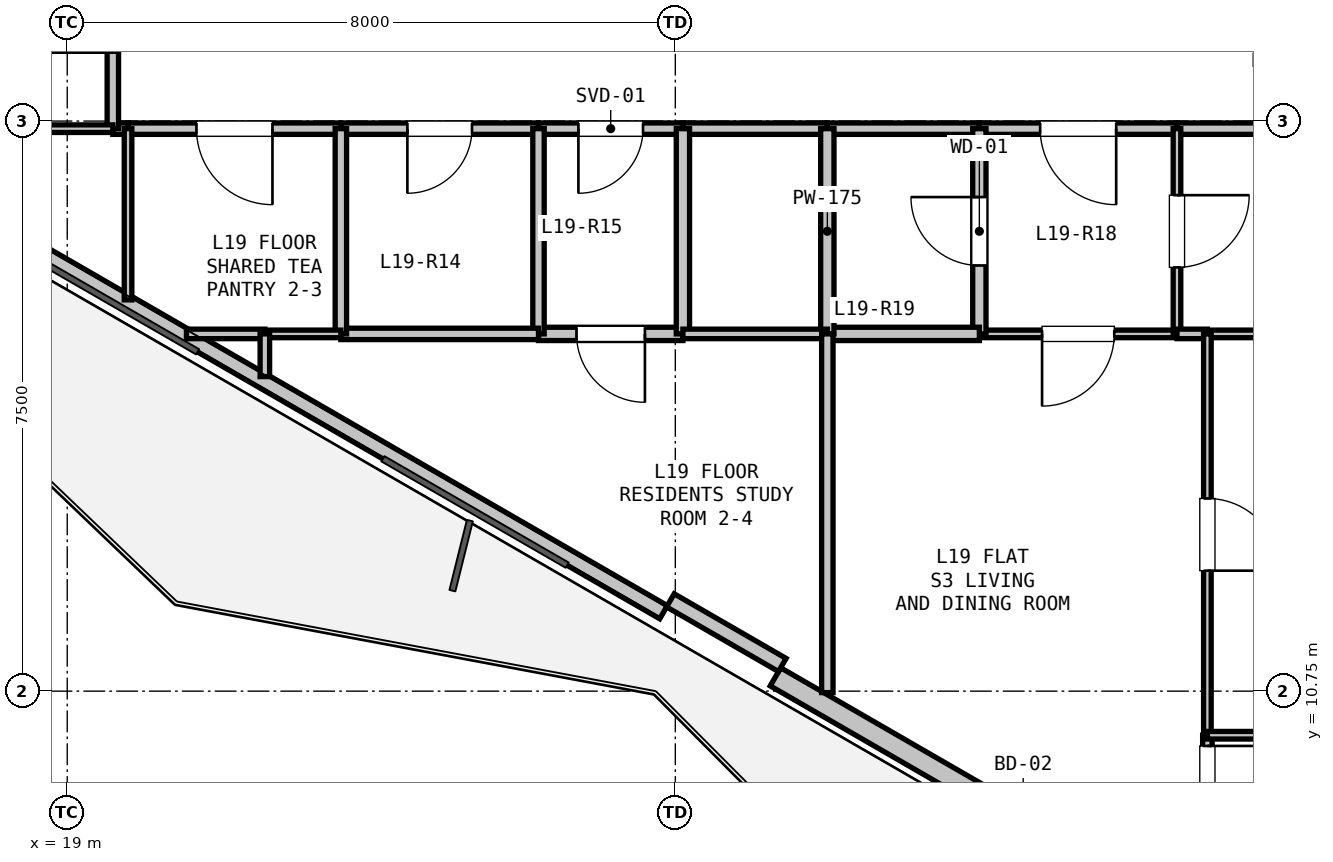
"""IFC4 building model, lengths in metres.
Left out: names, types, materials, properties, quantities, classifications, styles, units other than length and angle.
Written with IfcOpenShell. Run it as: python <this file> out.ifc"""

import sys

from ifc_helpers import new_model, si_unit, direction, frame, frame_2d, origin, place, context, subcontext, project, spatial, rectangle, extrude, element, fill, save


model = new_model("IFC4")
c1 = context("Model", 3, precision=1e-05, world=origin(), true_north=direction((0.0, 1.0)))
c2 = subcontext(c1, "Body", "Model", "MODEL_VIEW")
j1 = project(units=[si_unit("LENGTHUNIT", "METRE"), si_unit("PLANEANGLEUNIT", "RADIAN")], contexts=[c1])
p1 = place(None, origin())
s1 = spatial("IfcSite", under=j1, at=p1, CompositionType="ELEMENT")
p2 = place(p1, origin())
s2 = spatial("IfcBuilding", under=s1, at=p2, CompositionType="ELEMENT")
p3 = place(p2, frame((0.0, 0.0, 73.5)))
s3 = spatial("IfcBuildingStorey", under=s2, at=p3, CompositionType="ELEMENT", Elevation=73.5)
p4 = place(p3, frame((38.649, 4.973, 0.0), z_axis=(0.0, 0.0, 1.0), x_axis=(-0.866023023012, 0.500004123596, 0.0)))
e1 = element("IfcWall", 1, at=p4, inside=s3, PredefinedType="SOLIDWALL", context=c2, shape_type="SweptSolid", body=[
    extrude(rectangle(XDim=11.93, YDim=0.275, at=frame_2d((5.965, 0.0))), origin(), (0.0, 0.0, 1.0), 2.67),
])
p5 = place(p4, frame((7.616, 0.0, 0.0)))
e2 = element("IfcOpeningElement", 2, at=p5, cuts=e1, PredefinedType="OPENING", context=c2, shape_type="SweptSolid", body=[
    extrude(rectangle(XDim=1.1, YDim=2.1, at=frame_2d((0.55, 1.05))), frame((0.0, 0.147, 0.0), z_axis=(0.0, -1.0, 0.0), x_axis=(1.0, 0.0, 0.0)), (0.0, 0.0, 1.0), 0.295),
])
p6 = place(p4, frame((2.207, 0.0, 0.9)))
e3 = element("IfcOpeningElement", 3, at=p6, cuts=e1, PredefinedType="OPENING", context=c2, shape_type="SweptSolid", body=[
    extrude(rectangle(XDim=1.2, YDim=1.4, at=frame_2d((0.6, 0.7))), frame((0.0, 0.147, 0.0), z_axis=(0.0, -1.0, 0.0), x_axis=(1.0, 0.0, 0.0)), (0.0, 0.0, 1.0), 0.295),
])
p7 = place(p3, frame((26.845, 11.788, 0.0), z_axis=(0.0, 0.0, 1.0), x_axis=(-0.866027010039, 0.499997217876, 0.0)))
e4 = element("IfcWall", 4, at=p7, inside=s3, PredefinedType="PARAPET", context=c2, shape_type="SweptSolid", body=[
    extrude(rectangle(XDim=11.229, YDim=0.2, at=frame_2d((5.615, 0.0))), origin(), (0.0, 0.0, 1.0), 0.2),
])
p8 = place(p3, frame((28.407, 11.094, 0.0), z_axis=(0.0, 0.0, 1.0), x_axis=(-0.86605165483, 0.499954529098, 0.0)))
e5 = element("IfcWall", 5, at=p8, inside=s3, PredefinedType="PARAPET", context=c2, shape_type="SweptSolid", body=[
    extrude(rectangle(XDim=1.7, YDim=0.2, at=frame_2d((0.85, 0.0))), origin(), (0.0, 0.0, 1.0), 2.67),
])
p9 = place(p3, frame((35.8, 18.15, 0.0), z_axis=(0.0, 0.0, 1.0), x_axis=(-1.0, 0.0, 0.0)))
e6 = element("IfcWall", 6, at=p9, inside=s3, PredefinedType="PARTITIONING", context=c2, shape_type="SweptSolid", body=[
    extrude(rectangle(XDim=2.2, YDim=0.15, at=frame_2d((1.1, 0.0))), origin(), (0.0, 0.0, 1.0), 3.05),
])
p10 = place(p3, frame((33.6, 18.15, 0.0), z_axis=(0.0, 0.0, 1.0), x_axis=(-1.0, 0.0, 0.0)))
e7 = element("IfcWall", 7, at=p10, inside=s3, PredefinedType="PARTITIONING", context=c2, shape_type="SweptSolid", body=[
    extrude(rectangle(XDim=2.6, YDim=0.15, at=frame_2d((1.3, 0.0))), origin(), (0.0, 0.0, 1.0), 3.05),
])
p11 = place(p10, frame((0.8, 0.0, 0.0)))
e8 = element("IfcOpeningElement", 8, at=p11, cuts=e7, PredefinedType="OPENING", context=c2, shape_type="SweptSolid", body=[
    extrude(rectangle(XDim=1.0, YDim=2.15, at=frame_2d((0.5, 1.075))), frame((0.0, 0.085, 0.0), z_axis=(0.0, -1.0, 0.0), x_axis=(1.0, 0.0, 0.0)), (0.0, 0.0, 1.0), 0.17),
])
p12 = place(p3, frame((31.0, 18.15, 0.0), z_axis=(0.0, 0.0, 1.0), x_axis=(-1.0, 0.0, 0.0)))
e9 = element("IfcWall", 9, at=p12, inside=s3, PredefinedType="PARTITIONING", context=c2, shape_type="SweptSolid", body=[
    extrude(rectangle(XDim=2.0, YDim=0.15, at=frame_2d((1.0, 0.0))), origin(), (0.0, 0.0, 1.0), 3.05),
])
p13 = place(p3, frame((29.0, 18.15, 0.0), z_axis=(0.0, 0.0, 1.0), x_axis=(-1.0, 0.0, 0.0)))
e10 = element("IfcWall", 10, at=p13, inside=s3, PredefinedType="PARTITIONING", context=c2, shape_type="SweptSolid", body=[
    extrude(rectangle(XDim=1.9, YDim=0.15, at=frame_2d((0.95, 0.0))), origin(), (0.0, 0.0, 1.0), 3.05),
])
p14 = place(p3, frame((27.1, 18.15, 0.0), z_axis=(0.0, 0.0, 1.0), x_axis=(-1.0, 0.0, 0.0)))
e11 = element("IfcWall", 11, at=p14, inside=s3, PredefinedType="PARTITIONING", context=c2, shape_type="SweptSolid", body=[
    extrude(rectangle(XDim=1.9, YDim=0.15, at=frame_2d((0.95, 0.0))), origin(), (0.0, 0.0, 1.0), 3.05),
])
p15 = place(p14, frame((0.525, 0.0, 0.0)))
e12 = element("IfcOpeningElement", 12, at=p15, cuts=e11, PredefinedType="OPENING", context=c2, shape_type="SweptSolid", body=[
    extrude(rectangle(XDim=0.85, YDim=2.1, at=frame_2d((0.425, 1.05))), frame((0.0, 0.085, 0.0), z_axis=(0.0, -1.0, 0.0), x_axis=(1.0, 0.0, 0.0)), (0.0, 0.0, 1.0), 0.17),
])
p16 = place(p3, frame((25.2, 18.15, 0.0), z_axis=(0.0, 0.0, 1.0), x_axis=(-1.0, 0.0, 0.0)))
e13 = element("IfcWall", 13, at=p16, inside=s3, PredefinedType="PARTITIONING", context=c2, shape_type="SweptSolid", body=[
    extrude(rectangle(XDim=2.6, YDim=0.15, at=frame_2d((1.3, 0.0))), origin(), (0.0, 0.0, 1.0), 2.423),
])
p17 = place(p16, frame((0.875, 0.0, 0.0)))
e14 = element("IfcOpeningElement", 14, at=p17, cuts=e13, PredefinedType="OPENING", context=c2, shape_type="SweptSolid", body=[
    extrude(rectangle(XDim=0.85, YDim=2.1, at=frame_2d((0.425, 1.05))), frame((0.0, 0.085, 0.0), z_axis=(0.0, -1.0, 0.0), x_axis=(1.0, 0.0, 0.0)), (0.0, 0.0, 1.0), 0.17),
])
p18 = place(p3, frame((22.6, 18.15, 0.0), z_axis=(0.0, 0.0, 1.0), x_axis=(-1.0, 0.0, 0.0)))
e15 = element("IfcWall", 15, at=p18, inside=s3, PredefinedType="PARTITIONING", context=c2, shape_type="SweptSolid", body=[
    extrude(rectangle(XDim=2.8, YDim=0.15, at=frame_2d((1.4, 0.0))), origin(), (0.0, 0.0, 1.0), 3.05),
])
p19 = place(p18, frame((0.9, 0.0, 0.0)))
e16 = element("IfcOpeningElement", 16, at=p19, cuts=e15, PredefinedType="OPENING", context=c2, shape_type="SweptSolid", body=[
    extrude(rectangle(XDim=1.0, YDim=2.15, at=frame_2d((0.5, 1.075))), frame((0.0, 0.085, 0.0), z_axis=(0.0, -1.0, 0.0), x_axis=(1.0, 0.0, 0.0)), (0.0, 0.0, 1.0), 0.17),
])
p20 = place(p3, frame((19.8, 18.15, 0.0), z_axis=(0.0, 0.0, 1.0), x_axis=(-1.0, 0.0, 0.0)))
e17 = element("IfcWall", 17, at=p20, inside=s3, PredefinedType="PARTITIONING", context=c2, shape_type="SweptSolid", body=[
    extrude(rectangle(XDim=0.2, YDim=0.15, at=frame_2d((0.1, 0.0))), origin(), (0.0, 0.0, 1.0), 3.05),
])
p21 = place(p3, frame((19.6, 18.15, 0.0), z_axis=(0.0, 0.0, 1.0), x_axis=(0.0, 1.0, 0.0)))
e18 = element("IfcWall", 18, at=p21, inside=s3, PredefinedType="PARTITIONING", context=c2, shape_type="SweptSolid", body=[
    extrude(rectangle(XDim=3.0, YDim=0.15, at=frame_2d((1.5, 0.0))), origin(), (0.0, 0.0, 1.0), 2.423),
])
p22 = place(p21, frame((1.0, 0.0, 0.0)))
e19 = element("IfcOpeningElement", 19, at=p22, cuts=e18, PredefinedType="OPENING", context=c2, shape_type="SweptSolid", body=[
    extrude(rectangle(XDim=1.0, YDim=2.15, at=frame_2d((0.5, 1.075))), frame((0.0, 0.085, 0.0), z_axis=(0.0, -1.0, 0.0), x_axis=(1.0, 0.0, 0.0)), (0.0, 0.0, 1.0), 0.17),
])
p23 = place(p3, frame((33.6, 15.45, 0.0), z_axis=(0.0, 0.0, 1.0), x_axis=(-1.0, 0.0, 0.0)))
e20 = element("IfcWall", 20, at=p23, inside=s3, PredefinedType="PARTITIONING", context=c2, shape_type="SweptSolid", body=[
    extrude(rectangle(XDim=2.6, YDim=0.1, at=frame_2d((1.3, 0.0))), origin(), (0.0, 0.0, 1.0), 3.05),
])
p24 = place(p23, frame((0.825, 0.0, 0.0)))
e21 = element("IfcOpeningElement", 21, at=p24, cuts=e20, PredefinedType="OPENING", context=c2, shape_type="SweptSolid", body=[
    extrude(rectangle(XDim=0.95, YDim=2.1, at=frame_2d((0.475, 1.05))), frame((0.0, 0.06, 0.0), z_axis=(0.0, -1.0, 0.0), x_axis=(1.0, 0.0, 0.0)), (0.0, 0.0, 1.0), 0.12),
])
p25 = place(p3, frame((31.0, 15.45, 0.0), z_axis=(0.0, 0.0, 1.0), x_axis=(0.0, 1.0, 0.0)))
e22 = element("IfcWall", 22, at=p25, inside=s3, PredefinedType="PLUMBINGWALL", context=c2, shape_type="SweptSolid", body=[
    extrude(rectangle(XDim=2.7, YDim=0.175, at=frame_2d((1.35, 0.0))), origin(), (0.0, 0.0, 1.0), 3.05),
])
p26 = place(p25, frame((0.9, 0.0, 0.0)))
e23 = element("IfcOpeningElement", 23, at=p26, cuts=e22, PredefinedType="OPENING", context=c2, shape_type="SweptSolid", body=[
    extrude(rectangle(XDim=0.9, YDim=2.1, at=frame_2d((0.45, 1.05))), frame((0.0, 0.097, 0.0), z_axis=(0.0, -1.0, 0.0), x_axis=(1.0, 0.0, 0.0)), (0.0, 0.0, 1.0), 0.195),
])
p27 = place(p3, frame((33.6, 18.15, 0.0), z_axis=(0.0, 0.0, 1.0), x_axis=(0.0, -1.0, 0.0)))
e24 = element("IfcWall", 24, at=p27, inside=s3, PredefinedType="PARTITIONING", context=c2, shape_type="SweptSolid", body=[
    extrude(rectangle(XDim=2.7, YDim=0.1, at=frame_2d((1.35, 0.0))), origin(), (0.0, 0.0, 1.0), 3.05),
])
p28 = place(p27, frame((0.875, 0.0, 0.0)))
e25 = element("IfcOpeningElement", 25, at=p28, cuts=e24, PredefinedType="OPENING", context=c2, shape_type="SweptSolid", body=[
    extrude(rectangle(XDim=0.95, YDim=2.1, at=frame_2d((0.475, 1.05))), frame((0.0, 0.06, 0.0), z_axis=(0.0, -1.0, 0.0), x_axis=(1.0, 0.0, 0.0)), (0.0, 0.0, 1.0), 0.12),
])
p29 = place(p3, frame((27.1, 15.45, 0.0), z_axis=(0.0, 0.0, 1.0), x_axis=(-1.0, 0.0, 0.0)))
e26 = element("IfcWall", 26, at=p29, inside=s3, PredefinedType="PLUMBINGWALL", context=c2, shape_type="SweptSolid", body=[
    extrude(rectangle(XDim=1.9, YDim=0.175, at=frame_2d((0.95, 0.0))), origin(), (0.0, 0.0, 1.0), 2.423),
])
p30 = place(p29, frame((0.5, 0.0, 0.0)))
e27 = element("IfcOpeningElement", 27, at=p30, cuts=e26, PredefinedType="OPENING", context=c2, shape_type="SweptSolid", body=[
    extrude(rectangle(XDim=0.9, YDim=2.1, at=frame_2d((0.45, 1.05))), frame((0.0, 0.097, 0.0), z_axis=(0.0, -1.0, 0.0), x_axis=(1.0, 0.0, 0.0)), (0.0, 0.0, 1.0), 0.195),
])
p31 = place(p3, frame((25.2, 15.45, 0.0), z_axis=(0.0, 0.0, 1.0), x_axis=(0.0, 1.0, 0.0)))
e28 = element("IfcWall", 28, at=p31, inside=s3, PredefinedType="PARTITIONING", context=c2, shape_type="SweptSolid", body=[
    extrude(rectangle(XDim=2.7, YDim=0.15, at=frame_2d((1.35, 0.0))), origin(), (0.0, 0.0, 1.0), 2.423),
])
p32 = place(p3, frame((27.1, 18.15, 0.0), z_axis=(0.0, 0.0, 1.0), x_axis=(0.0, -1.0, 0.0)))
e29 = element("IfcWall", 29, at=p32, inside=s3, PredefinedType="PLUMBINGWALL", context=c2, shape_type="SweptSolid", body=[
    extrude(rectangle(XDim=2.7, YDim=0.175, at=frame_2d((1.35, 0.0))), origin(), (0.0, 0.0, 1.0), 3.05),
])
p33 = place(p3, frame((31.0, 15.45, 0.0), z_axis=(0.0, 0.0, 1.0), x_axis=(-1.0, 0.0, 0.0)))
e30 = element("IfcWall", 30, at=p33, inside=s3, PredefinedType="PLUMBINGWALL", context=c2, shape_type="SweptSolid", body=[
    extrude(rectangle(XDim=2.0, YDim=0.175, at=frame_2d((1.0, 0.0))), origin(), (0.0, 0.0, 1.0), 3.05),
])
p34 = place(p3, frame((29.0, 15.45, 0.0), z_axis=(0.0, 0.0, 1.0), x_axis=(0.0, 1.0, 0.0)))
e31 = element("IfcWall", 31, at=p34, inside=s3, PredefinedType="PLUMBINGWALL", context=c2, shape_type="SweptSolid", body=[
    extrude(rectangle(XDim=2.7, YDim=0.175, at=frame_2d((1.35, 0.0))), origin(), (0.0, 0.0, 1.0), 3.05),
])
p35 = place(p3, frame((42.873, 15.45, 0.0), z_axis=(0.0, 0.0, 1.0), x_axis=(-1.0, 0.0, 0.0)))
e32 = element("IfcWall", 32, at=p35, inside=s3, PredefinedType="PARTITIONING", context=c2, shape_type="SweptSolid", body=[
    extrude(rectangle(XDim=8.873, YDim=0.1, at=frame_2d((4.437, 0.0))), origin(), (0.0, 0.0, 1.0), 2.365),
])
p36 = place(p35, frame((3.962, 0.0, 0.0)))
e33 = element("IfcOpeningElement", 33, at=p36, cuts=e32, PredefinedType="OPENING", context=c2, shape_type="SweptSolid", body=[
    extrude(rectangle(XDim=0.95, YDim=2.1, at=frame_2d((0.475, 1.05))), frame((0.0, 0.06, 0.0), z_axis=(0.0, -1.0, 0.0), x_axis=(1.0, 0.0, 0.0)), (0.0, 0.0, 1.0), 0.12),
])
p37 = place(p3, frame((34.0, 15.45, 0.0), z_axis=(0.0, 0.0, 1.0), x_axis=(-1.0, 0.0, 0.0)))
e34 = element("IfcWall", 34, at=p37, inside=s3, PredefinedType="PARTITIONING", context=c2, shape_type="SweptSolid", body=[
    extrude(rectangle(XDim=0.4, YDim=0.125, at=frame_2d((0.2, 0.0))), origin(), (0.0, 0.0, 1.0), 3.05),
])
p38 = place(p3, frame((19.6, 18.15, 0.0), z_axis=(0.0, 0.0, 1.0), x_axis=(-1.0, 0.0, 0.0)))
e35 = element("IfcWall", 35, at=p38, inside=s3, PredefinedType="PARTITIONING", context=c2, shape_type="SweptSolid", body=[
    extrude(rectangle(XDim=2.45, YDim=0.1, at=frame_2d((1.225, 0.0))), origin(), (0.0, 0.0, 1.0), 2.365),
])
p39 = place(p3, frame((25.2, 15.45, 0.0), z_axis=(0.0, 0.0, 1.0), x_axis=(-1.0, 0.0, 0.0)))
e36 = element("IfcWall", 36, at=p39, inside=s3, PredefinedType="PARTITIONING", context=c2, shape_type="SweptSolid", body=[
    extrude(rectangle(XDim=2.6, YDim=0.15, at=frame_2d((1.3, 0.0))), origin(), (0.0, 0.0, 1.0), 3.05),
])
p40 = place(p3, frame((22.6, 15.45, 0.0), z_axis=(0.0, 0.0, 1.0), x_axis=(0.0, 1.0, 0.0)))
e37 = element("IfcWall", 37, at=p40, inside=s3, PredefinedType="PARTITIONING", context=c2, shape_type="SweptSolid", body=[
    extrude(rectangle(XDim=2.7, YDim=0.15, at=frame_2d((1.35, 0.0))), origin(), (0.0, 0.0, 1.0), 3.05),
])
p41 = place(p3, frame((22.6, 15.45, 0.0), z_axis=(0.0, 0.0, 1.0), x_axis=(-1.0, 0.0, 0.0)))
e38 = element("IfcWall", 38, at=p41, inside=s3, PredefinedType="PARTITIONING", context=c2, shape_type="SweptSolid", body=[
    extrude(rectangle(XDim=1.0, YDim=0.1, at=frame_2d((0.5, 0.0))), origin(), (0.0, 0.0, 1.0), 2.365),
])
p42 = place(p3, frame((21.6, 15.45, 0.0), z_axis=(0.0, 0.0, 1.0), x_axis=(-1.0, 0.0, 0.0)))
e39 = element("IfcWall", 39, at=p42, inside=s3, PredefinedType="PARTITIONING", context=c2, shape_type="SweptSolid", body=[
    extrude(rectangle(XDim=1.032, YDim=0.125, at=frame_2d((0.516, 0.0))), origin(), (0.0, 0.0, 1.0), 2.365),
])
p43 = place(p3, frame((19.8, 15.897, 0.0), z_axis=(0.0, 0.0, 1.0), x_axis=(0.0, 1.0, 0.0)))
e40 = element("IfcWall", 40, at=p43, inside=s3, PredefinedType="PARTITIONING", context=c2, shape_type="SweptSolid", body=[
    extrude(rectangle(XDim=2.252, YDim=0.1, at=frame_2d((1.126, 0.0))), origin(), (0.0, 0.0, 1.0), 2.365),
])
p44 = place(p3, frame((27.1, 15.45, 0.0), z_axis=(0.0, 0.0, 1.0), x_axis=(1.0, 0.0, 0.0)))
e41 = element("IfcWall", 41, at=p44, inside=s3, PredefinedType="PARTITIONING", context=c2, shape_type="SweptSolid", body=[
    extrude(rectangle(XDim=1.9, YDim=0.125, at=frame_2d((0.95, 0.0))), origin(), (0.0, 0.0, 1.0), 3.05),
])
p45 = place(p3, frame((29.0, 15.45, 0.0), z_axis=(0.0, 0.0, 1.0), x_axis=(0.0, -1.0, 0.0)))
e42 = element("IfcWall", 42, at=p45, inside=s3, PredefinedType="PARTITIONING", context=c2, shape_type="SweptSolid", body=[
    extrude(rectangle(XDim=4.719, YDim=0.15, at=frame_2d((2.36, 0.0))), origin(), (0.0, 0.0, 1.0), 2.365),
])
p46 = place(p3, frame((21.6, 14.888, 0.0), z_axis=(0.0, 0.0, 1.0), x_axis=(0.0, 1.0, 0.0)))
e43 = element("IfcWall", 43, at=p46, inside=s3, PredefinedType="PARTITIONING", context=c2, shape_type="SweptSolid", body=[
    extrude(rectangle(XDim=0.562, YDim=0.125, at=frame_2d((0.281, 0.0))), origin(), (0.0, 0.0, 1.0), 2.365),
])
p47 = place(p3, frame((34.0, 15.45, 0.0), z_axis=(0.0, 0.0, 1.0), x_axis=(0.0, -1.0, 0.0)))
e44 = element("IfcWall", 44, at=p47, inside=s3, PredefinedType="PARTITIONING", context=c2, shape_type="SweptSolid", body=[
    extrude(rectangle(XDim=5.28, YDim=0.1, at=frame_2d((2.64, 0.0))), origin(), (0.0, 0.0, 1.0), 3.05),
])
p48 = place(p47, frame((2.165, 0.0, 0.0)))
e45 = element("IfcOpeningElement", 45, at=p48, cuts=e44, PredefinedType="OPENING", context=c2, shape_type="SweptSolid", body=[
    extrude(rectangle(XDim=0.95, YDim=2.1, at=frame_2d((0.475, 1.05))), frame((0.0, 0.06, 0.0), z_axis=(0.0, -1.0, 0.0), x_axis=(1.0, 0.0, 0.0)), (0.0, 0.0, 1.0), 0.12),
])
p49 = place(p3, frame((34.0, 10.17, 0.0), z_axis=(0.0, 0.0, 1.0), x_axis=(0.0, -1.0, 0.0)))
e46 = element("IfcWall", 46, at=p49, inside=s3, PredefinedType="PARTITIONING", context=c2, shape_type="SweptSolid", body=[
    extrude(rectangle(XDim=2.326, YDim=0.125, at=frame_2d((1.163, 0.0))), origin(), (0.0, 0.0, 1.0), 3.05),
])
p50 = place(p49, frame((0.141, 0.0, 0.0)))
e47 = element("IfcOpeningElement", 47, at=p50, cuts=e46, PredefinedType="OPENING", context=c2, shape_type="SweptSolid", body=[
    extrude(rectangle(XDim=0.95, YDim=2.1, at=frame_2d((0.475, 1.05))), frame((0.0, 0.073, 0.0), z_axis=(0.0, -1.0, 0.0), x_axis=(1.0, 0.0, 0.0)), (0.0, 0.0, 1.0), 0.145),
])
p51 = place(p3, frame((34.0, 10.17, 0.0), z_axis=(0.0, 0.0, 1.0), x_axis=(1.0, 0.0, 0.0)))
e48 = element("IfcWall", 48, at=p51, inside=s3, PredefinedType="PARTITIONING", context=c2, shape_type="SweptSolid", body=[
    extrude(rectangle(XDim=8.873, YDim=0.1, at=frame_2d((4.437, 0.0))), origin(), (0.0, 0.0, 1.0), 2.423),
])
p52 = place(p51, frame((3.962, 0.0, 0.0)))
e49 = element("IfcOpeningElement", 49, at=p52, cuts=e48, PredefinedType="OPENING", context=c2, shape_type="SweptSolid", body=[
    extrude(rectangle(XDim=0.95, YDim=2.1, at=frame_2d((0.475, 1.05))), frame((0.0, 0.06, 0.0), z_axis=(0.0, -1.0, 0.0), x_axis=(1.0, 0.0, 0.0)), (0.0, 0.0, 1.0), 0.12),
])
p53 = place(p11, origin())
e50 = element("IfcDoor", 50, at=p53, inside=s3, OperationType="SINGLE_SWING_LEFT", PredefinedType="DOOR", context=c2, shape_type="SweptSolid", body=[
    extrude(rectangle(XDim=1.0, YDim=2.15, at=frame_2d((0.5, 1.075))), frame((0.0, 0.025, 0.0), z_axis=(0.0, -1.0, 0.0), x_axis=(1.0, 0.0, 0.0)), (0.0, 0.0, 1.0), 0.05),
])
fill(e8, e50)
p54 = place(p15, origin())
e51 = element("IfcDoor", 51, at=p54, inside=s3, OperationType="SINGLE_SWING_RIGHT", PredefinedType="DOOR", context=c2, shape_type="SweptSolid", body=[
    extrude(rectangle(XDim=0.85, YDim=2.1, at=frame_2d((0.425, 1.05))), frame((0.0, 0.025, 0.0), z_axis=(0.0, -1.0, 0.0), x_axis=(1.0, 0.0, 0.0)), (0.0, 0.0, 1.0), 0.05),
])
fill(e12, e51)
p55 = place(p17, origin())
e52 = element("IfcDoor", 52, at=p55, inside=s3, OperationType="SINGLE_SWING_RIGHT", PredefinedType="DOOR", context=c2, shape_type="SweptSolid", body=[
    extrude(rectangle(XDim=0.85, YDim=2.1, at=frame_2d((0.425, 1.05))), frame((0.0, 0.025, 0.0), z_axis=(0.0, -1.0, 0.0), x_axis=(1.0, 0.0, 0.0)), (0.0, 0.0, 1.0), 0.05),
])
fill(e14, e52)
p56 = place(p19, origin())
e53 = element("IfcDoor", 53, at=p56, inside=s3, OperationType="SINGLE_SWING_LEFT", PredefinedType="DOOR", context=c2, shape_type="SweptSolid", body=[
    extrude(rectangle(XDim=1.0, YDim=2.15, at=frame_2d((0.5, 1.075))), frame((0.0, 0.025, 0.0), z_axis=(0.0, -1.0, 0.0), x_axis=(1.0, 0.0, 0.0)), (0.0, 0.0, 1.0), 0.05),
])
fill(e16, e53)
p57 = place(p26, origin())
e54 = element("IfcDoor", 54, at=p57, inside=s3, OperationType="SINGLE_SWING_RIGHT", PredefinedType="DOOR", context=c2, shape_type="SweptSolid", body=[
    extrude(rectangle(XDim=0.9, YDim=2.1, at=frame_2d((0.45, 1.05))), frame((0.0, 0.025, 0.0), z_axis=(0.0, -1.0, 0.0), x_axis=(1.0, 0.0, 0.0)), (0.0, 0.0, 1.0), 0.05),
])
fill(e23, e54)
p58 = place(p28, origin())
e55 = element("IfcDoor", 55, at=p58, inside=s3, OperationType="SINGLE_SWING_LEFT", PredefinedType="DOOR", context=c2, shape_type="SweptSolid", body=[
    extrude(rectangle(XDim=0.95, YDim=2.1, at=frame_2d((0.475, 1.05))), frame((0.0, 0.025, 0.0), z_axis=(0.0, -1.0, 0.0), x_axis=(1.0, 0.0, 0.0)), (0.0, 0.0, 1.0), 0.05),
])
fill(e25, e55)
p59 = place(p24, origin())
e56 = element("IfcDoor", 56, at=p59, inside=s3, OperationType="SINGLE_SWING_RIGHT", PredefinedType="DOOR", context=c2, shape_type="SweptSolid", body=[
    extrude(rectangle(XDim=0.95, YDim=2.1, at=frame_2d((0.475, 1.05))), frame((0.0, 0.025, 0.0), z_axis=(0.0, -1.0, 0.0), x_axis=(1.0, 0.0, 0.0)), (0.0, 0.0, 1.0), 0.05),
])
fill(e21, e56)
p60 = place(p50, origin())
e57 = element("IfcDoor", 57, at=p60, inside=s3, OperationType="SINGLE_SWING_LEFT", PredefinedType="DOOR", context=c2, shape_type="SweptSolid", body=[
    extrude(rectangle(XDim=0.95, YDim=2.1, at=frame_2d((0.475, 1.05))), frame((0.0, 0.025, 0.0), z_axis=(0.0, -1.0, 0.0), x_axis=(1.0, 0.0, 0.0)), (0.0, 0.0, 1.0), 0.05),
])
fill(e47, e57)
p61 = place(p48, origin())
e58 = element("IfcDoor", 58, at=p61, inside=s3, OperationType="SINGLE_SWING_RIGHT", PredefinedType="DOOR", context=c2, shape_type="SweptSolid", body=[
    extrude(rectangle(XDim=0.95, YDim=2.1, at=frame_2d((0.475, 1.05))), frame((0.0, 0.025, 0.0), z_axis=(0.0, -1.0, 0.0), x_axis=(1.0, 0.0, 0.0)), (0.0, 0.0, 1.0), 0.05),
])
fill(e45, e58)
p62 = place(p30, origin())
e59 = element("IfcDoor", 59, at=p62, inside=s3, OperationType="SINGLE_SWING_LEFT", PredefinedType="DOOR", context=c2, shape_type="SweptSolid", body=[
    extrude(rectangle(XDim=0.9, YDim=2.1, at=frame_2d((0.45, 1.05))), frame((0.0, 0.025, 0.0), z_axis=(0.0, -1.0, 0.0), x_axis=(1.0, 0.0, 0.0)), (0.0, 0.0, 1.0), 0.05),
])
fill(e27, e59)
save(model, sys.argv[1])
